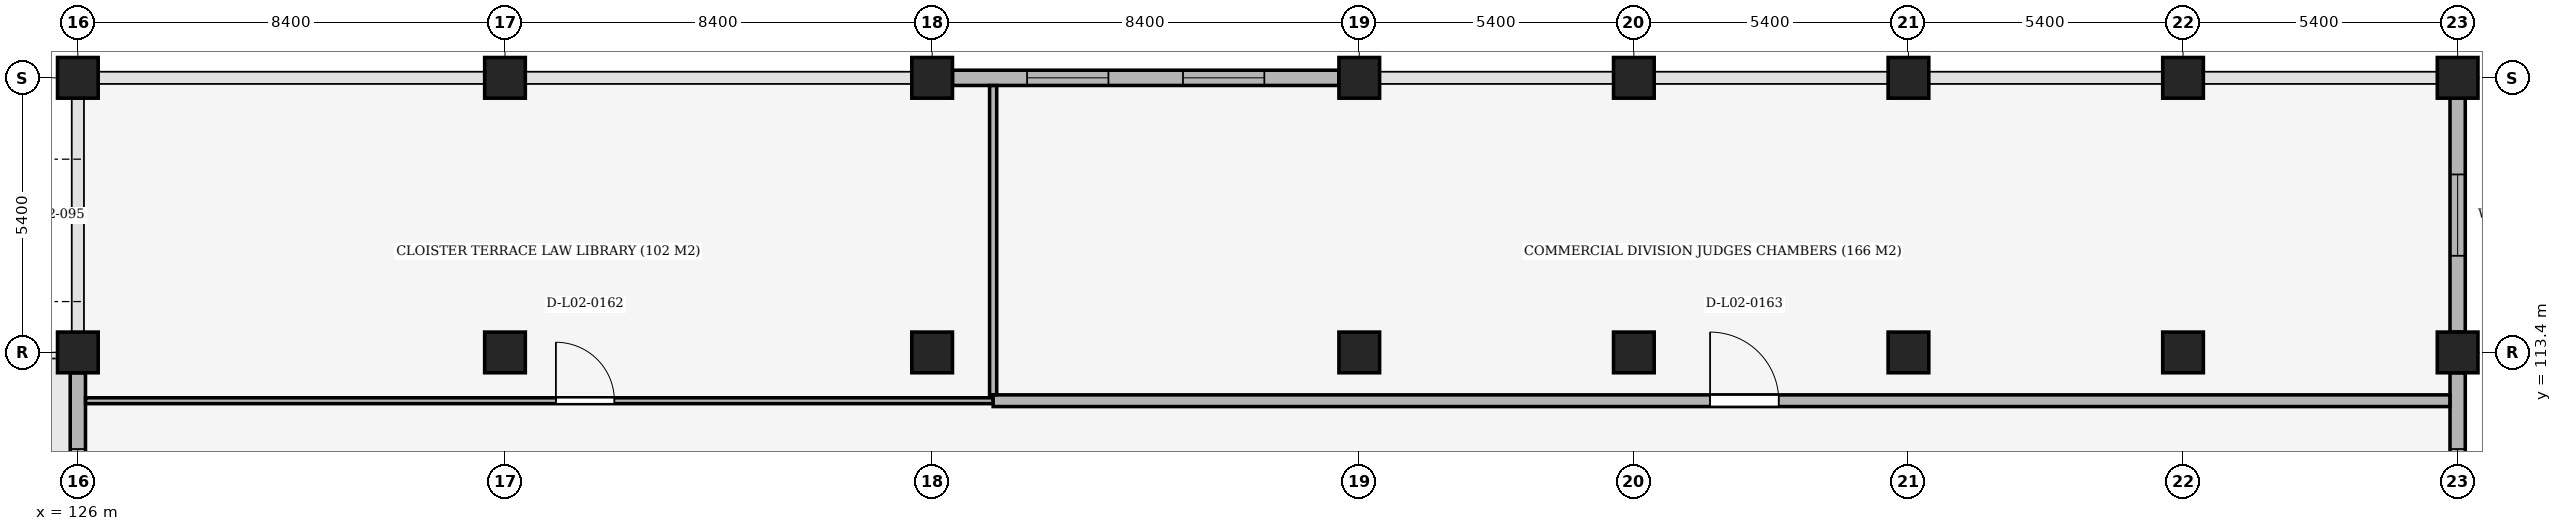
"""IFC4 building model, lengths in metres.
Left out: names, types, materials, properties, quantities, classifications, styles, units other than length and angle.
Written with IfcOpenShell. Run it as: python <this file> out.ifc"""

import sys

from ifc_helpers import new_model, si_unit, direction, frame, frame_2d, origin, origin_2d, place, context, subcontext, project, spatial, rectangle, extrude, element, fill, save


model = new_model("IFC4")
c1 = context("Model", 3, precision=1e-05, world=origin(), true_north=direction((0.0, 1.0)))
c2 = subcontext(c1, "Body", "Model", "MODEL_VIEW")
j1 = project(units=[si_unit("LENGTHUNIT", "METRE"), si_unit("PLANEANGLEUNIT", "RADIAN")], contexts=[c1])
p1 = place(None, origin())
s1 = spatial("IfcSite", under=j1, at=p1, CompositionType="ELEMENT")
p2 = place(p1, origin())
s2 = spatial("IfcBuilding", under=s1, at=p2, CompositionType="ELEMENT")
p3 = place(p2, frame((0.0, 0.0, 10.2)))
s3 = spatial("IfcBuildingStorey", under=s2, at=p3, CompositionType="ELEMENT", Elevation=10.2)
for number, where, z_axis, x_axis in (
    (1, (126.0, 113.4, 0.0), (0.0, 0.0, 1.0), (1.0, 0.0, 0.0)),
    (2, (126.0, 118.8, 0.0), (0.0, 0.0, 1.0), (1.0, 0.0, 0.0)),
    (3, (134.4, 113.4, 0.0), (0.0, 0.0, 1.0), (1.0, 0.0, 0.0)),
    (4, (134.4, 118.8, 0.0), (0.0, 0.0, 1.0), (1.0, 0.0, 0.0)),
    (5, (142.8, 113.4, 0.0), (0.0, 0.0, 1.0), (1.0, 0.0, 0.0)),
    (6, (142.8, 118.8, 0.0), (0.0, 0.0, 1.0), (1.0, 0.0, 0.0)),
    (7, (151.2, 113.4, 0.0), (0.0, 0.0, 1.0), (1.0, 0.0, 0.0)),
    (8, (151.2, 118.8, 0.0), (0.0, 0.0, 1.0), (1.0, 0.0, 0.0)),
    (9, (156.6, 113.4, 0.0), (0.0, 0.0, 1.0), (1.0, 0.0, 0.0)),
    (10, (156.6, 118.8, 0.0), (0.0, 0.0, 1.0), (1.0, 0.0, 0.0)),
    (11, (162.0, 113.4, 0.0), (0.0, 0.0, 1.0), (1.0, 0.0, 0.0)),
    (12, (162.0, 118.8, 0.0), (0.0, 0.0, 1.0), (1.0, 0.0, 0.0)),
    (13, (167.4, 113.4, 0.0), (0.0, 0.0, 1.0), (1.0, 0.0, 0.0)),
    (14, (167.4, 118.8, 0.0), (0.0, 0.0, 1.0), (1.0, 0.0, 0.0)),
    (15, (172.8, 113.4, 0.0), (0.0, 0.0, 1.0), (1.0, 0.0, 0.0)),
    (16, (172.8, 118.8, 0.0), (0.0, 0.0, 1.0), (1.0, 0.0, 0.0)),
):
    element("IfcColumn", number, at=place(p3, frame(where, z_axis=z_axis, x_axis=x_axis)), inside=s3, PredefinedType="COLUMN", context=c2, shape_type="SweptSolid", body=[
        extrude(rectangle(XDim=0.8, YDim=0.8, at=origin_2d()), origin(), (0.0, 0.0, 1.0), 5.1),
    ])
p4 = place(p3, frame((143.2, 118.8, 0.0), z_axis=(0.0, 0.0, 1.0), x_axis=(1.0, 0.0, 0.0)))
e17 = element("IfcWall", 17, at=p4, inside=s3, PredefinedType="SOLIDWALL", context=c2, shape_type="SweptSolid", body=[
    extrude(rectangle(XDim=7.6, YDim=0.3, at=frame_2d((3.8, 0.0))), origin(), (0.0, 0.0, 1.0), 4.12),
])
p5 = place(p4, frame((1.467, 0.0, 1.05)))
e18 = element("IfcOpeningElement", 18, at=p5, cuts=e17, PredefinedType="OPENING", context=c2, shape_type="SweptSolid", body=[
    extrude(rectangle(XDim=1.6, YDim=1.8, at=frame_2d((0.8, 0.9))), frame((0.0, 0.165, 0.0), z_axis=(0.0, -1.0, 0.0), x_axis=(1.0, 0.0, 0.0)), (0.0, 0.0, 1.0), 0.33),
])
p6 = place(p4, frame((4.533, 0.0, 1.05)))
e19 = element("IfcOpeningElement", 19, at=p6, cuts=e17, PredefinedType="OPENING", context=c2, shape_type="SweptSolid", body=[
    extrude(rectangle(XDim=1.6, YDim=1.8, at=frame_2d((0.8, 0.9))), frame((0.0, 0.165, 0.0), z_axis=(0.0, -1.0, 0.0), x_axis=(1.0, 0.0, 0.0)), (0.0, 0.0, 1.0), 0.33),
])
p7 = place(p3, frame((172.8, 118.4, 0.0), z_axis=(0.0, 0.0, 1.0), x_axis=(0.0, -1.0, 0.0)))
e20 = element("IfcWall", 20, at=p7, inside=s3, PredefinedType="SOLIDWALL", context=c2, shape_type="SweptSolid", body=[
    extrude(rectangle(XDim=4.6, YDim=0.3, at=frame_2d((2.3, 0.0))), origin(), (0.0, 0.0, 1.0), 4.27),
])
p8 = place(p7, frame((1.5, 0.0, 1.05)))
e21 = element("IfcOpeningElement", 21, at=p8, cuts=e20, PredefinedType="OPENING", context=c2, shape_type="SweptSolid", body=[
    extrude(rectangle(XDim=1.6, YDim=1.8, at=frame_2d((0.8, 0.9))), frame((0.0, 0.165, 0.0), z_axis=(0.0, -1.0, 0.0), x_axis=(1.0, 0.0, 0.0)), (0.0, 0.0, 1.0), 0.33),
])
p9 = place(p3, frame((172.8, 113.0, 0.0), z_axis=(0.0, 0.0, 1.0), x_axis=(0.0, -1.0, 0.0)))
e22 = element("IfcWall", 22, at=p9, inside=s3, PredefinedType="SOLIDWALL", context=c2, shape_type="SweptSolid", body=[
    extrude(rectangle(XDim=4.6, YDim=0.3, at=frame_2d((2.3, 0.0))), origin(), (0.0, 0.0, 1.0), 4.27),
])
p10 = place(p9, frame((1.5, 0.0, 1.05)))
e23 = element("IfcOpeningElement", 23, at=p10, cuts=e22, PredefinedType="OPENING", context=c2, shape_type="SweptSolid", body=[
    extrude(rectangle(XDim=1.6, YDim=1.8, at=frame_2d((0.8, 0.9))), frame((0.0, 0.165, 0.0), z_axis=(0.0, -1.0, 0.0), x_axis=(1.0, 0.0, 0.0)), (0.0, 0.0, 1.0), 0.33),
])
p11 = place(p3, frame((126.0, 108.4, 0.0), z_axis=(0.0, 0.0, 1.0), x_axis=(0.0, 1.0, 0.0)))
e24 = element("IfcWall", 24, at=p11, inside=s3, PredefinedType="SOLIDWALL", context=c2, shape_type="SweptSolid", body=[
    extrude(rectangle(XDim=4.6, YDim=0.3, at=frame_2d((2.3, 0.0))), origin(), (0.0, 0.0, 1.0), 4.27),
])
p12 = place(p11, frame((1.5, 0.0, 1.05)))
e25 = element("IfcOpeningElement", 25, at=p12, cuts=e24, PredefinedType="OPENING", context=c2, shape_type="SweptSolid", body=[
    extrude(rectangle(XDim=1.6, YDim=1.8, at=frame_2d((0.8, 0.9))), frame((0.0, 0.165, 0.0), z_axis=(0.0, -1.0, 0.0), x_axis=(1.0, 0.0, 0.0)), (0.0, 0.0, 1.0), 0.33),
])
p13 = place(p3, frame((126.152, 112.45, 0.0), z_axis=(0.0, 0.0, 1.0), x_axis=(1.0, 0.0, 0.0)))
e26 = element("IfcWall", 26, at=p13, inside=s3, PredefinedType="PARTITIONING", context=c2, shape_type="SweptSolid", body=[
    extrude(rectangle(XDim=17.848, YDim=0.115, at=frame_2d((8.924, 0.0))), origin(), (0.0, 0.0, 1.0), 4.27),
])
p14 = place(p13, frame((9.249, 0.0, 0.0)))
e27 = element("IfcOpeningElement", 27, at=p14, cuts=e26, PredefinedType="OPENING", context=c2, shape_type="SweptSolid", body=[
    extrude(rectangle(XDim=1.15, YDim=2.15, at=frame_2d((0.575, 1.075))), frame((0.0, 0.072, 0.0), z_axis=(0.0, -1.0, 0.0), x_axis=(1.0, 0.0, 0.0)), (0.0, 0.0, 1.0), 0.145),
])
p15 = place(p3, frame((144.0, 112.45, 0.0), z_axis=(0.0, 0.0, 1.0), x_axis=(1.0, 0.0, 0.0)))
e28 = element("IfcWall", 28, at=p15, inside=s3, PredefinedType="SOLIDWALL", context=c2, shape_type="SweptSolid", body=[
    extrude(rectangle(XDim=28.648, YDim=0.23, at=frame_2d((14.324, 0.0))), origin(), (0.0, 0.0, 1.0), 4.27),
])
p16 = place(p15, frame((14.099, 0.0, 0.0)))
e29 = element("IfcOpeningElement", 29, at=p16, cuts=e28, PredefinedType="OPENING", context=c2, shape_type="SweptSolid", body=[
    extrude(rectangle(XDim=1.35, YDim=2.2, at=frame_2d((0.675, 1.1))), frame((0.0, 0.13, 0.0), z_axis=(0.0, -1.0, 0.0), x_axis=(1.0, 0.0, 0.0)), (0.0, 0.0, 1.0), 0.26),
])
p17 = place(p3, frame((144.0, 112.567, 0.0), z_axis=(0.0, 0.0, 1.0), x_axis=(0.0, 1.0, 0.0)))
e30 = element("IfcWall", 30, at=p17, inside=s3, PredefinedType="PARTITIONING", context=c2, shape_type="SweptSolid", body=[
    extrude(rectangle(XDim=6.081, YDim=0.14, at=frame_2d((3.041, 0.0))), origin(), (0.0, 0.0, 1.0), 4.12),
])
p18 = place(p5, origin())
e31 = element("IfcWindow", 31, at=p18, inside=s3, PartitioningType="SINGLE_PANEL", PredefinedType="WINDOW", context=c2, shape_type="SweptSolid", body=[
    extrude(rectangle(XDim=1.6, YDim=1.8, at=frame_2d((0.8, 0.9))), frame((0.0, 0.03, 0.0), z_axis=(0.0, -1.0, 0.0), x_axis=(1.0, 0.0, 0.0)), (0.0, 0.0, 1.0), 0.06),
])
fill(e18, e31)
p19 = place(p6, origin())
e32 = element("IfcWindow", 32, at=p19, inside=s3, PartitioningType="SINGLE_PANEL", PredefinedType="WINDOW", context=c2, shape_type="SweptSolid", body=[
    extrude(rectangle(XDim=1.6, YDim=1.8, at=frame_2d((0.8, 0.9))), frame((0.0, 0.03, 0.0), z_axis=(0.0, -1.0, 0.0), x_axis=(1.0, 0.0, 0.0)), (0.0, 0.0, 1.0), 0.06),
])
fill(e19, e32)
p20 = place(p8, origin())
e33 = element("IfcWindow", 33, at=p20, inside=s3, PartitioningType="SINGLE_PANEL", PredefinedType="WINDOW", context=c2, shape_type="SweptSolid", body=[
    extrude(rectangle(XDim=1.6, YDim=1.8, at=frame_2d((0.8, 0.9))), frame((0.0, 0.03, 0.0), z_axis=(0.0, -1.0, 0.0), x_axis=(1.0, 0.0, 0.0)), (0.0, 0.0, 1.0), 0.06),
])
fill(e21, e33)
p21 = place(p10, origin())
e34 = element("IfcWindow", 34, at=p21, inside=s3, PartitioningType="SINGLE_PANEL", PredefinedType="WINDOW", context=c2, shape_type="SweptSolid", body=[
    extrude(rectangle(XDim=1.6, YDim=1.8, at=frame_2d((0.8, 0.9))), frame((0.0, 0.03, 0.0), z_axis=(0.0, -1.0, 0.0), x_axis=(1.0, 0.0, 0.0)), (0.0, 0.0, 1.0), 0.06),
])
fill(e23, e34)
p22 = place(p12, origin())
e35 = element("IfcWindow", 35, at=p22, inside=s3, PartitioningType="SINGLE_PANEL", PredefinedType="WINDOW", context=c2, shape_type="SweptSolid", body=[
    extrude(rectangle(XDim=1.6, YDim=1.8, at=frame_2d((0.8, 0.9))), frame((0.0, 0.03, 0.0), z_axis=(0.0, -1.0, 0.0), x_axis=(1.0, 0.0, 0.0)), (0.0, 0.0, 1.0), 0.06),
])
fill(e25, e35)
p23 = place(p14, origin())
e36 = element("IfcDoor", 36, at=p23, inside=s3, OperationType="SINGLE_SWING_LEFT", PredefinedType="DOOR", context=c2, shape_type="SweptSolid", body=[
    extrude(rectangle(XDim=1.15, YDim=2.15, at=frame_2d((0.575, 1.075))), frame((0.0, 0.025, 0.0), z_axis=(0.0, -1.0, 0.0), x_axis=(1.0, 0.0, 0.0)), (0.0, 0.0, 1.0), 0.05),
])
fill(e27, e36)
p24 = place(p16, origin())
e37 = element("IfcDoor", 37, at=p24, inside=s3, OperationType="SINGLE_SWING_LEFT", PredefinedType="DOOR", context=c2, shape_type="SweptSolid", body=[
    extrude(rectangle(XDim=1.35, YDim=2.2, at=frame_2d((0.675, 1.1))), frame((0.0, 0.025, 0.0), z_axis=(0.0, -1.0, 0.0), x_axis=(1.0, 0.0, 0.0)), (0.0, 0.0, 1.0), 0.05),
])
fill(e29, e37)
save(model, sys.argv[1])
